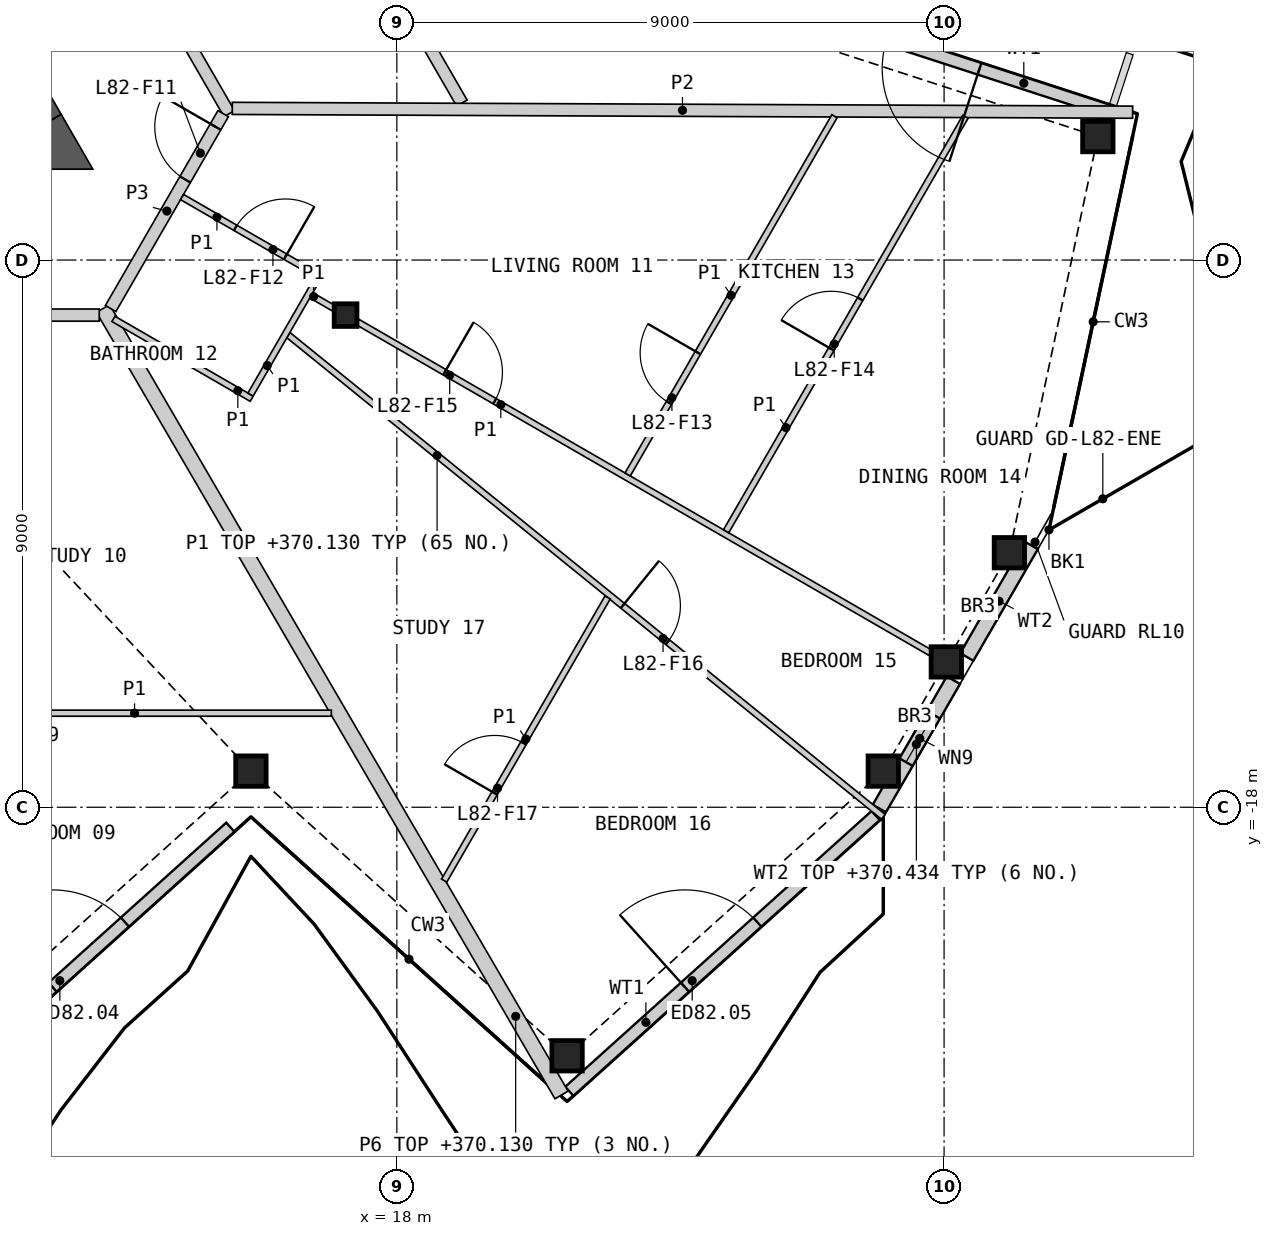
"""IFC4 building model, lengths in metres.
Left out: names, types, materials, properties, quantities, classifications, styles, units other than length and angle.
Written with IfcOpenShell. Run it as: python <this file> out.ifc"""

import sys

from ifc_helpers import new_model, si_unit, direction, frame, frame_2d, origin, origin_2d, place, context, subcontext, project, spatial, polyline, rectangle, hollow_rectangle, i_section, outline, extrude, element, fill, save


model = new_model("IFC4")
c1 = context("Model", 3, precision=1e-05, world=origin(), true_north=direction((0.0, 1.0)))
c2 = subcontext(c1, "Body", "Model", "MODEL_VIEW")
j1 = project(units=[si_unit("LENGTHUNIT", "METRE"), si_unit("PLANEANGLEUNIT", "RADIAN")], contexts=[c1])
p1 = place(None, origin())
s1 = spatial("IfcSite", under=j1, at=p1, CompositionType="ELEMENT")
p2 = place(p1, origin())
s2 = spatial("IfcBuilding", under=s1, at=p2, CompositionType="ELEMENT")
p3 = place(p2, frame((0.0, 0.0, 367.8)))
s3 = spatial("IfcBuildingStorey", under=s2, at=p3, CompositionType="ELEMENT", Elevation=367.8)
for number, where, z_axis, x_axis in (
    (1, (15.6, -17.406, 0.0), (0.0, 0.0, 1.0), (1.0, 0.0, 0.0)),
    (2, (20.8, -22.088, 0.0), (0.0, 0.0, 1.0), (1.0, 0.0, 0.0)),
    (3, (26.0, -17.406, 0.0), (0.0, 0.0, 1.0), (1.0, 0.0, 0.0)),
    (4, (27.037, -15.61, 0.0), (0.0, 0.0, 1.0), (1.0, 0.0, 0.0)),
    (5, (28.074, -13.814, 0.0), (0.0, 0.0, 1.0), (1.0, 0.0, 0.0)),
    (6, (29.529, -6.969, 0.0), (0.0, 0.0, 1.0), (1.0, 0.0, 0.0)),
):
    element("IfcColumn", number, at=place(p3, frame(where, z_axis=z_axis, x_axis=x_axis)), inside=s3, PredefinedType="COLUMN", context=c2, shape_type="SweptSolid", body=[
        extrude(hollow_rectangle(XDim=0.5, YDim=0.5, WallThickness=0.03, at=origin_2d()), origin(), (0.0, 0.0, 1.0), 3.4),
    ])
p4 = place(p3, frame((17.157, -9.906, 0.0), z_axis=(0.0, 0.0, 1.0), x_axis=(1.0, 0.0, 0.0)))
e7 = element("IfcColumn", 7, at=p4, inside=s3, PredefinedType="COLUMN", context=c2, shape_type="SweptSolid", body=[
    extrude(i_section(OverallWidth=0.374, OverallDepth=0.372, WebThickness=0.016, FlangeThickness=0.026, at=origin_2d()), origin(), (0.0, 0.0, 1.0), 3.4),
])
p5 = place(p3, frame((10.503, -22.612, 0.0), z_axis=(0.0, 0.0, 1.0), x_axis=(0.743148117717, 0.669126949939, 0.0)))
e8 = element("IfcWall", 8, at=p5, inside=s3, PredefinedType="SOLIDWALL", context=c2, shape_type="SweptSolid", body=[
    extrude(rectangle(XDim=6.402, YDim=0.2, at=frame_2d((3.201, 0.0))), origin(), (0.0, 0.0, 1.0), 2.634),
])
p6 = place(p5, frame((2.469, 0.0, 0.0)))
e9 = element("IfcOpeningElement", 9, at=p6, cuts=e8, PredefinedType="OPENING", context=c2, shape_type="SweptSolid", body=[
    extrude(rectangle(XDim=1.6, YDim=2.25, at=frame_2d((0.8, 1.125))), frame((0.0, 0.11, 0.0), z_axis=(0.0, -1.0, 0.0), x_axis=(1.0, 0.0, 0.0)), (0.0, 0.0, 1.0), 0.22),
])
p7 = place(p3, frame((20.837, -22.672, 0.0), z_axis=(0.0, 0.0, 1.0), x_axis=(0.743143698099, 0.669131858437, 0.0)))
e10 = element("IfcWall", 10, at=p7, inside=s3, PredefinedType="SOLIDWALL", context=c2, shape_type="SweptSolid", body=[
    extrude(rectangle(XDim=6.779, YDim=0.2, at=frame_2d((3.389, 0.0))), origin(), (0.0, 0.0, 1.0), 2.634),
])
p8 = place(p7, frame((2.559, 0.0, 0.0)))
e11 = element("IfcOpeningElement", 11, at=p8, cuts=e10, PredefinedType="OPENING", context=c2, shape_type="SweptSolid", body=[
    extrude(rectangle(XDim=1.6, YDim=2.25, at=frame_2d((0.8, 1.125))), frame((0.0, 0.11, 0.0), z_axis=(0.0, -1.0, 0.0), x_axis=(1.0, 0.0, 0.0)), (0.0, 0.0, 1.0), 0.22),
])
p9 = place(p3, frame((25.935, -18.02, 0.0), z_axis=(0.0, 0.0, 1.0), x_axis=(0.500028873844, 0.866008732821, 0.0)))
e12 = element("IfcWall", 12, at=p9, inside=s3, PredefinedType="SOLIDWALL", context=c2, shape_type="SweptSolid", body=[
    extrude(rectangle(XDim=2.437, YDim=0.25, at=frame_2d((1.218, 0.0))), origin(), (0.0, 0.0, 1.0), 2.634),
])
p10 = place(p9, frame((0.88, 0.0, 0.6)))
e13 = element("IfcOpeningElement", 13, at=p10, cuts=e12, PredefinedType="OPENING", context=c2, shape_type="SweptSolid", body=[
    extrude(rectangle(XDim=0.9, YDim=1.8, at=frame_2d((0.45, 0.9))), frame((0.0, 0.135, 0.0), z_axis=(0.0, -1.0, 0.0), x_axis=(1.0, 0.0, 0.0)), (0.0, 0.0, 1.0), 0.27),
])
p11 = place(p3, frame((27.374, -15.528, 0.0), z_axis=(0.0, 0.0, 1.0), x_axis=(0.499941779639, 0.866059014716, 0.0)))
e14 = element("IfcWall", 14, at=p11, inside=s3, PredefinedType="SOLIDWALL", context=c2, shape_type="SweptSolid", body=[
    extrude(rectangle(XDim=2.12, YDim=0.25, at=frame_2d((1.06, 0.0))), origin(), (0.0, 0.0, 1.0), 2.634),
])
p12 = place(p3, frame((29.801, -6.576, 0.0), z_axis=(0.0, 0.0, 1.0), x_axis=(-0.951060123915, 0.309005891041, 0.0)))
e15 = element("IfcWall", 15, at=p12, inside=s3, PredefinedType="SOLIDWALL", context=c2, shape_type="SweptSolid", body=[
    extrude(rectangle(XDim=6.265, YDim=0.2, at=frame_2d((3.133, 0.0))), origin(), (0.0, 0.0, 1.0), 2.634),
])
p13 = place(p12, frame((2.333, 0.0, 0.0)))
e16 = element("IfcOpeningElement", 16, at=p13, cuts=e15, PredefinedType="OPENING", context=c2, shape_type="SweptSolid", body=[
    extrude(rectangle(XDim=1.6, YDim=2.25, at=frame_2d((0.8, 1.125))), frame((0.0, 0.11, 0.0), z_axis=(0.0, -1.0, 0.0), x_axis=(1.0, 0.0, 0.0)), (0.0, 0.0, 1.0), 0.22),
])
p14 = place(p3, frame((12.221, -6.756, 0.0), z_axis=(0.0, 0.0, 1.0), x_axis=(-0.50000604952, 0.866021911064, 0.0)))
e17 = element("IfcWall", 17, at=p14, inside=s3, PredefinedType="SHEAR", context=c2, shape_type="SweptSolid", body=[
    extrude(rectangle(XDim=4.869, YDim=0.6, at=frame_2d((2.434, 0.0))), origin(), (0.0, 0.0, 1.0), 3.1),
])
p15 = place(p3, origin())
e18 = element("IfcWall", 18, at=p15, inside=s3, PredefinedType="SHEAR", context=c2, shape_type="SweptSolid", body=[
    extrude(outline(polyline([(11.961, -7.506), (11.961, -6.906), (12.48, -6.606), (13.0, -7.506), (11.961, -7.506)])), origin(), (0.0, 0.0, 1.0), 3.1),
])
p16 = place(p3, frame((13.168, -9.798, 0.0), z_axis=(0.0, 0.0, 1.0), x_axis=(0.503632750219, -0.863917850786, 0.0)))
e19 = element("IfcWall", 19, at=p16, inside=s3, PredefinedType="PARTITIONING", context=c2, shape_type="SweptSolid", body=[
    extrude(rectangle(XDim=14.972, YDim=0.25, at=frame_2d((7.486, 0.0))), origin(), (0.0, 0.0, 1.0), 2.33),
])
p17 = place(p3, frame((8.775, -9.906, 0.0), z_axis=(0.0, 0.0, 1.0), x_axis=(1.0, 0.0, 0.0)))
e20 = element("IfcWall", 20, at=p17, inside=s3, PredefinedType="PARTITIONING", context=c2, shape_type="SweptSolid", body=[
    extrude(rectangle(XDim=4.331, YDim=0.2, at=frame_2d((2.165, 0.0))), origin(), (0.0, 0.0, 1.0), 3.1),
])
p18 = place(p3, frame((12.981, -2.673, 0.0), z_axis=(0.0, 0.0, 1.0), x_axis=(0.499974648164, -0.866040040179, 0.0)))
e21 = element("IfcWall", 21, at=p18, inside=s3, PredefinedType="PARTITIONING", context=c2, shape_type="SweptSolid", body=[
    extrude(rectangle(XDim=4.525, YDim=0.2, at=frame_2d((2.263, 0.0))), origin(), (0.0, 0.0, 1.0), 3.1),
])
p19 = place(p3, frame((13.293, -9.797, 0.0), z_axis=(0.0, 0.0, 1.0), x_axis=(0.499977520935, 0.86603838169, 0.0)))
e22 = element("IfcWall", 22, at=p19, inside=s3, PredefinedType="PARTITIONING", context=c2, shape_type="SweptSolid", body=[
    extrude(rectangle(XDim=3.701, YDim=0.2, at=frame_2d((1.851, 0.0))), origin(), (0.0, 0.0, 1.0), 3.1),
])
p20 = place(p19, frame((2.451, 0.0, 0.0)))
e23 = element("IfcOpeningElement", 23, at=p20, cuts=e22, PredefinedType="OPENING", context=c2, shape_type="SweptSolid", body=[
    extrude(rectangle(XDim=1.0, YDim=2.1, at=frame_2d((0.5, 1.05))), frame((0.0, 0.11, 0.0), z_axis=(0.0, -1.0, 0.0), x_axis=(1.0, 0.0, 0.0)), (0.0, 0.0, 1.0), 0.22),
])
p21 = place(p3, frame((11.573, 6.566, 0.0), z_axis=(0.0, 0.0, 1.0), x_axis=(0.499993542657, -0.866029131901, 0.0)))
e24 = element("IfcWall", 24, at=p21, inside=s3, PredefinedType="PARTITIONING", context=c2, shape_type="SweptSolid", body=[
    extrude(rectangle(XDim=14.994, YDim=0.2, at=frame_2d((7.497, 0.0))), origin(), (0.0, 0.0, 1.0), 2.33),
])
p22 = place(p21, frame((5.166, 0.0, 0.0)))
e25 = element("IfcOpeningElement", 25, at=p22, cuts=e24, PredefinedType="OPENING", context=c2, shape_type="SweptSolid", body=[
    extrude(rectangle(XDim=0.95, YDim=2.1, at=frame_2d((0.475, 1.05))), frame((0.0, 0.11, 0.0), z_axis=(0.0, -1.0, 0.0), x_axis=(1.0, 0.0, 0.0)), (0.0, 0.0, 1.0), 0.22),
])
p23 = place(p3, frame((15.294, -6.506, 0.0), z_axis=(0.0, 0.0, 1.0), x_axis=(0.99999116141, -0.004204414611, 0.0)))
e26 = element("IfcWall", 26, at=p23, inside=s3, PredefinedType="PARTITIONING", context=c2, shape_type="SweptSolid", body=[
    extrude(rectangle(XDim=14.807, YDim=0.2, at=frame_2d((7.404, 0.0))), origin(), (0.0, 0.0, 1.0), 2.33),
])
p24 = place(p3, frame((16.216, -10.234, 0.0), z_axis=(0.0, 0.0, 1.0), x_axis=(0.777145059662, -0.629321504672, 0.0)))
e27 = element("IfcWall", 27, at=p24, inside=s3, PredefinedType="PARTITIONING", context=c2, shape_type="SweptSolid", body=[
    extrude(rectangle(XDim=12.59, YDim=0.1, at=frame_2d((6.295, 0.0))), origin(), (0.0, 0.0, 1.0), 2.33),
])
p25 = place(p24, frame((7.074, 0.0, 0.0)))
e28 = element("IfcOpeningElement", 28, at=p25, cuts=e27, PredefinedType="OPENING", context=c2, shape_type="SweptSolid", body=[
    extrude(rectangle(XDim=0.95, YDim=2.1, at=frame_2d((0.475, 1.05))), frame((0.0, 0.06, 0.0), z_axis=(0.0, -1.0, 0.0), x_axis=(1.0, 0.0, 0.0)), (0.0, 0.0, 1.0), 0.12),
])
p26 = place(p3, frame((17.354, -10.019, 0.0), z_axis=(0.0, 0.0, 1.0), x_axis=(0.866019680922, -0.500009912158, 0.0)))
e29 = element("IfcWall", 29, at=p26, inside=s3, PredefinedType="PARTITIONING", context=c2, shape_type="SweptSolid", body=[
    extrude(rectangle(XDim=10.881, YDim=0.1, at=frame_2d((5.44, 0.0))), origin(), (0.0, 0.0, 1.0), 2.33),
])
p27 = place(p26, frame((1.655, 0.0, 0.0)))
e30 = element("IfcOpeningElement", 30, at=p27, cuts=e29, PredefinedType="OPENING", context=c2, shape_type="SweptSolid", body=[
    extrude(rectangle(XDim=0.95, YDim=2.1, at=frame_2d((0.475, 1.05))), frame((0.0, 0.06, 0.0), z_axis=(0.0, -1.0, 0.0), x_axis=(1.0, 0.0, 0.0)), (0.0, 0.0, 1.0), 0.12),
])
p28 = place(p3, frame((23.415, -13.461, 0.0), z_axis=(0.0, 0.0, 1.0), x_axis=(0.500011483804, 0.866018773506, 0.0)))
e31 = element("IfcWall", 31, at=p28, inside=s3, PredefinedType="PARTITIONING", context=c2, shape_type="SweptSolid", body=[
    extrude(rectangle(XDim=7.872, YDim=0.1, at=frame_2d((3.936, 0.0))), origin(), (0.0, 0.0, 1.0), 2.33),
])
p29 = place(p28, frame((3.461, 0.0, 0.0)))
e32 = element("IfcOpeningElement", 32, at=p29, cuts=e31, PredefinedType="OPENING", context=c2, shape_type="SweptSolid", body=[
    extrude(rectangle(XDim=0.95, YDim=2.1, at=frame_2d((0.475, 1.05))), frame((0.0, 0.06, 0.0), z_axis=(0.0, -1.0, 0.0), x_axis=(1.0, 0.0, 0.0)), (0.0, 0.0, 1.0), 0.12),
])
p30 = place(p3, frame((21.796, -12.526, 0.0), z_axis=(0.0, 0.0, 1.0), x_axis=(0.499994777381, 0.866028419044, 0.0)))
e33 = element("IfcWall", 33, at=p30, inside=s3, PredefinedType="PARTITIONING", context=c2, shape_type="SweptSolid", body=[
    extrude(rectangle(XDim=6.803, YDim=0.1, at=frame_2d((3.402, 0.0))), origin(), (0.0, 0.0, 1.0), 2.33),
])
p31 = place(p30, frame((1.361, 0.0, 0.0)))
e34 = element("IfcOpeningElement", 34, at=p31, cuts=e33, PredefinedType="OPENING", context=c2, shape_type="SweptSolid", body=[
    extrude(rectangle(XDim=0.95, YDim=2.1, at=frame_2d((0.475, 1.05))), frame((0.0, 0.06, 0.0), z_axis=(0.0, -1.0, 0.0), x_axis=(1.0, 0.0, 0.0)), (0.0, 0.0, 1.0), 0.12),
])
p32 = place(p3, frame((10.45, -16.453, 0.0), z_axis=(0.0, 0.0, 1.0), x_axis=(1.0, 0.0, 0.0)))
e35 = element("IfcWall", 35, at=p32, inside=s3, PredefinedType="PARTITIONING", context=c2, shape_type="SweptSolid", body=[
    extrude(rectangle(XDim=6.473, YDim=0.1, at=frame_2d((3.236, 0.0))), origin(), (0.0, 0.0, 1.0), 2.33),
])
p33 = place(p32, frame((0.853, 0.0, 0.0)))
e36 = element("IfcOpeningElement", 36, at=p33, cuts=e35, PredefinedType="OPENING", context=c2, shape_type="SweptSolid", body=[
    extrude(rectangle(XDim=0.95, YDim=2.1, at=frame_2d((0.475, 1.05))), frame((0.0, 0.06, 0.0), z_axis=(0.0, -1.0, 0.0), x_axis=(1.0, 0.0, 0.0)), (0.0, 0.0, 1.0), 0.12),
])
p34 = place(p3, frame((18.778, -19.206, 0.0), z_axis=(0.0, 0.0, 1.0), x_axis=(0.499992359988, 0.866029814703, 0.0)))
e37 = element("IfcWall", 37, at=p34, inside=s3, PredefinedType="PARTITIONING", context=c2, shape_type="SweptSolid", body=[
    extrude(rectangle(XDim=5.376, YDim=0.1, at=frame_2d((2.688, 0.0))), origin(), (0.0, 0.0, 1.0), 2.33),
])
p35 = place(p34, frame((1.659, 0.0, 0.0)))
e38 = element("IfcOpeningElement", 38, at=p35, cuts=e37, PredefinedType="OPENING", context=c2, shape_type="SweptSolid", body=[
    extrude(rectangle(XDim=0.95, YDim=2.1, at=frame_2d((0.475, 1.05))), frame((0.0, 0.06, 0.0), z_axis=(0.0, -1.0, 0.0), x_axis=(1.0, 0.0, 0.0)), (0.0, 0.0, 1.0), 0.12),
])
p36 = place(p3, frame((14.467, -7.964, 0.0), z_axis=(0.0, 0.0, 1.0), x_axis=(0.86601223543, -0.500022807565, 0.0)))
e39 = element("IfcWall", 39, at=p36, inside=s3, PredefinedType="PARTITIONING", context=c2, shape_type="SweptSolid", body=[
    extrude(rectangle(XDim=2.65, YDim=0.1, at=frame_2d((1.325, 0.0))), origin(), (0.0, 0.0, 1.0), 2.33),
])
p37 = place(p36, frame((1.014, 0.0, 0.0)))
e40 = element("IfcOpeningElement", 40, at=p37, cuts=e39, PredefinedType="OPENING", context=c2, shape_type="SweptSolid", body=[
    extrude(rectangle(XDim=0.95, YDim=2.1, at=frame_2d((0.475, 1.05))), frame((0.0, 0.06, 0.0), z_axis=(0.0, -1.0, 0.0), x_axis=(1.0, 0.0, 0.0)), (0.0, 0.0, 1.0), 0.12),
])
p38 = place(p3, frame((13.339, -9.968, 0.0), z_axis=(0.0, 0.0, 1.0), x_axis=(0.866013657776, -0.500020344131, 0.0)))
e41 = element("IfcWall", 41, at=p38, inside=s3, PredefinedType="PARTITIONING", context=c2, shape_type="SweptSolid", body=[
    extrude(rectangle(XDim=2.625, YDim=0.1, at=frame_2d((1.312, 0.0))), origin(), (0.0, 0.0, 1.0), 2.33),
])
p39 = place(p3, frame((15.594, -11.212, 0.0), z_axis=(0.0, 0.0, 1.0), x_axis=(0.499981787252, 0.866035918664, 0.0)))
e42 = element("IfcWall", 42, at=p39, inside=s3, PredefinedType="PARTITIONING", context=c2, shape_type="SweptSolid", body=[
    extrude(rectangle(XDim=2.2, YDim=0.1, at=frame_2d((1.1, 0.0))), origin(), (0.0, 0.0, 1.0), 2.33),
])
p40 = place(p3, frame((16.594, -9.581, 0.0), z_axis=(0.0, 0.0, 1.0), x_axis=(0.866137484628, -0.499805820016, 0.0)))
e43 = element("IfcWall", 43, at=p40, inside=s3, PredefinedType="PARTITIONING", context=c2, shape_type="SweptSolid", body=[
    extrude(rectangle(XDim=0.423, YDim=0.1, at=frame_2d((0.211, 0.0))), origin(), (0.0, 0.0, 1.0), 2.33),
])
p41 = place(p6, origin())
e44 = element("IfcDoor", 44, at=p41, inside=s3, OperationType="DOUBLE_DOOR_SINGLE_SWING", PredefinedType="DOOR", context=c2, shape_type="SweptSolid", body=[
    extrude(rectangle(XDim=1.6, YDim=2.25, at=frame_2d((0.8, 1.125))), frame((0.0, 0.025, 0.0), z_axis=(0.0, -1.0, 0.0), x_axis=(1.0, 0.0, 0.0)), (0.0, 0.0, 1.0), 0.05),
])
fill(e9, e44)
p42 = place(p8, origin())
e45 = element("IfcDoor", 45, at=p42, inside=s3, OperationType="DOUBLE_DOOR_SINGLE_SWING", PredefinedType="DOOR", context=c2, shape_type="SweptSolid", body=[
    extrude(rectangle(XDim=1.6, YDim=2.25, at=frame_2d((0.8, 1.125))), frame((0.0, 0.025, 0.0), z_axis=(0.0, -1.0, 0.0), x_axis=(1.0, 0.0, 0.0)), (0.0, 0.0, 1.0), 0.05),
])
fill(e11, e45)
p43 = place(p10, origin())
e46 = element("IfcWindow", 46, at=p43, inside=s3, PartitioningType="SINGLE_PANEL", PredefinedType="WINDOW", context=c2, shape_type="SweptSolid", body=[
    extrude(rectangle(XDim=0.9, YDim=1.8, at=frame_2d((0.45, 0.9))), frame((0.0, 0.03, 0.0), z_axis=(0.0, -1.0, 0.0), x_axis=(1.0, 0.0, 0.0)), (0.0, 0.0, 1.0), 0.06),
])
fill(e13, e46)
p44 = place(p13, origin())
e47 = element("IfcDoor", 47, at=p44, inside=s3, OperationType="DOUBLE_DOOR_SINGLE_SWING", PredefinedType="DOOR", context=c2, shape_type="SweptSolid", body=[
    extrude(rectangle(XDim=1.6, YDim=2.25, at=frame_2d((0.8, 1.125))), frame((0.0, 0.025, 0.0), z_axis=(0.0, -1.0, 0.0), x_axis=(1.0, 0.0, 0.0)), (0.0, 0.0, 1.0), 0.05),
])
fill(e16, e47)
p45 = place(p20, origin())
e48 = element("IfcDoor", 48, at=p45, inside=s3, OperationType="SINGLE_SWING_RIGHT", PredefinedType="DOOR", context=c2, shape_type="SweptSolid", body=[
    extrude(rectangle(XDim=1.0, YDim=2.1, at=frame_2d((0.5, 1.05))), frame((0.0, 0.025, 0.0), z_axis=(0.0, -1.0, 0.0), x_axis=(1.0, 0.0, 0.0)), (0.0, 0.0, 1.0), 0.05),
])
fill(e23, e48)
p46 = place(p37, origin())
e49 = element("IfcDoor", 49, at=p46, inside=s3, OperationType="SINGLE_SWING_RIGHT", PredefinedType="DOOR", context=c2, shape_type="SweptSolid", body=[
    extrude(rectangle(XDim=0.95, YDim=2.1, at=frame_2d((0.475, 1.05))), frame((0.0, 0.025, 0.0), z_axis=(0.0, -1.0, 0.0), x_axis=(1.0, 0.0, 0.0)), (0.0, 0.0, 1.0), 0.05),
])
fill(e40, e49)
p47 = place(p31, origin())
e50 = element("IfcDoor", 50, at=p47, inside=s3, OperationType="SINGLE_SWING_RIGHT", PredefinedType="DOOR", context=c2, shape_type="SweptSolid", body=[
    extrude(rectangle(XDim=0.95, YDim=2.1, at=frame_2d((0.475, 1.05))), frame((0.0, 0.025, 0.0), z_axis=(0.0, -1.0, 0.0), x_axis=(1.0, 0.0, 0.0)), (0.0, 0.0, 1.0), 0.05),
])
fill(e34, e50)
p48 = place(p29, origin())
e51 = element("IfcDoor", 51, at=p48, inside=s3, OperationType="SINGLE_SWING_LEFT", PredefinedType="DOOR", context=c2, shape_type="SweptSolid", body=[
    extrude(rectangle(XDim=0.95, YDim=2.1, at=frame_2d((0.475, 1.05))), frame((0.0, 0.025, 0.0), z_axis=(0.0, -1.0, 0.0), x_axis=(1.0, 0.0, 0.0)), (0.0, 0.0, 1.0), 0.05),
])
fill(e32, e51)
p49 = place(p27, origin())
e52 = element("IfcDoor", 52, at=p49, inside=s3, OperationType="SINGLE_SWING_LEFT", PredefinedType="DOOR", context=c2, shape_type="SweptSolid", body=[
    extrude(rectangle(XDim=0.95, YDim=2.1, at=frame_2d((0.475, 1.05))), frame((0.0, 0.025, 0.0), z_axis=(0.0, -1.0, 0.0), x_axis=(1.0, 0.0, 0.0)), (0.0, 0.0, 1.0), 0.05),
])
fill(e30, e52)
p50 = place(p25, origin())
e53 = element("IfcDoor", 53, at=p50, inside=s3, OperationType="SINGLE_SWING_LEFT", PredefinedType="DOOR", context=c2, shape_type="SweptSolid", body=[
    extrude(rectangle(XDim=0.95, YDim=2.1, at=frame_2d((0.475, 1.05))), frame((0.0, 0.025, 0.0), z_axis=(0.0, -1.0, 0.0), x_axis=(1.0, 0.0, 0.0)), (0.0, 0.0, 1.0), 0.05),
])
fill(e28, e53)
p51 = place(p35, origin())
e54 = element("IfcDoor", 54, at=p51, inside=s3, OperationType="SINGLE_SWING_LEFT", PredefinedType="DOOR", context=c2, shape_type="SweptSolid", body=[
    extrude(rectangle(XDim=0.95, YDim=2.1, at=frame_2d((0.475, 1.05))), frame((0.0, 0.025, 0.0), z_axis=(0.0, -1.0, 0.0), x_axis=(1.0, 0.0, 0.0)), (0.0, 0.0, 1.0), 0.05),
])
fill(e38, e54)
save(model, sys.argv[1])
